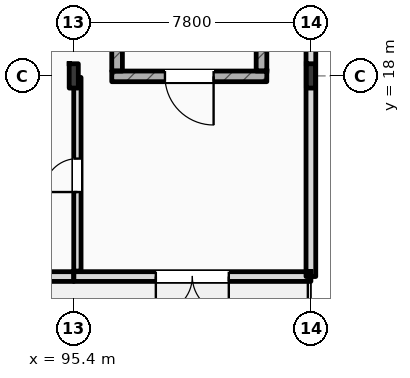
"""IFC4 building model, lengths in metres.
Left out: names, types, materials, properties, quantities, classifications, styles, units other than length and angle.
Written with IfcOpenShell. Run it as: python <this file> out.ifc"""

import sys

from ifc_helpers import new_model, si_unit, direction, frame, frame_2d, origin, origin_2d, place, context, subcontext, project, spatial, rectangle, i_section, extrude, element, fill, save


model = new_model("IFC4")
c1 = context("Model", 3, precision=1e-05, world=origin(), true_north=direction((0.0, 1.0)))
c2 = subcontext(c1, "Body", "Model", "MODEL_VIEW")
j1 = project(units=[si_unit("LENGTHUNIT", "METRE"), si_unit("PLANEANGLEUNIT", "RADIAN")], contexts=[c1])
p1 = place(None, origin())
s1 = spatial("IfcSite", under=j1, at=p1, CompositionType="ELEMENT")
p2 = place(p1, origin())
s2 = spatial("IfcBuilding", under=s1, at=p2, CompositionType="ELEMENT")
p3 = place(p2, origin())
s3 = spatial("IfcBuildingStorey", under=s2, at=p3, CompositionType="ELEMENT", Elevation=0.0)
for number, where, z_axis, x_axis in (
    (1, (95.4, 18.0, 0.0), (0.0, 0.0, 1.0), (1.0, 0.0, 0.0)),
    (2, (103.2, 18.0, 0.0), (0.0, 0.0, 1.0), (1.0, 0.0, 0.0)),
):
    element("IfcColumn", number, at=place(p3, frame(where, z_axis=z_axis, x_axis=x_axis)), inside=s3, PredefinedType="COLUMN", context=c2, shape_type="SweptSolid", body=[
        extrude(i_section(OverallWidth=0.3, OverallDepth=0.8, WebThickness=0.018, FlangeThickness=0.033, FilletRadius=0.03, at=origin_2d()), origin(), (0.0, 0.0, 1.0), 6.0),
    ])
p4 = place(p3, frame((96.65, 17.985, 0.0), z_axis=(0.0, 0.0, 1.0), x_axis=(1.0, 0.0, 0.0)))
e3 = element("IfcWall", 3, at=p4, inside=s3, PredefinedType="SHEAR", context=c2, shape_type="SweptSolid", body=[
    extrude(rectangle(XDim=5.1, YDim=0.35, at=frame_2d((2.55, 0.0))), origin(), (0.0, 0.0, 1.0), 6.0),
])
p5 = place(p4, frame((1.75, 0.0, 0.0)))
e4 = element("IfcOpeningElement", 4, at=p5, cuts=e3, PredefinedType="OPENING", context=c2, shape_type="SweptSolid", body=[
    extrude(rectangle(XDim=1.6, YDim=2.2, at=frame_2d((0.8, 1.1))), frame((0.0, 0.185, 0.0), z_axis=(0.0, -1.0, 0.0), x_axis=(1.0, 0.0, 0.0)), (0.0, 0.0, 1.0), 0.37),
])
for number, where, z_axis, x_axis in (
    (5, (96.825, 18.16, 0.0), (0.0, 0.0, 1.0), (0.0, 1.0, 0.0)),
    (6, (101.575, 18.16, 0.0), (0.0, 0.0, 1.0), (0.0, 1.0, 0.0)),
):
    element("IfcWall", number, at=place(p3, frame(where, z_axis=z_axis, x_axis=x_axis)), inside=s3, PredefinedType="SHEAR", context=c2, shape_type="SweptSolid", body=[
        extrude(rectangle(XDim=8.68, YDim=0.35, at=frame_2d((4.34, 0.0))), origin(), (0.0, 0.0, 1.0), 6.0),
    ])
p6 = place(p3, frame((87.6, 11.4, 0.0), z_axis=(0.0, 0.0, 1.0), x_axis=(1.0, 0.0, 0.0)))
e7 = element("IfcWall", 7, at=p6, inside=s3, PredefinedType="STANDARD", context=c2, shape_type="SweptSolid", body=[
    extrude(rectangle(XDim=7.8, YDim=0.32, at=frame_2d((3.9, 0.0))), origin(), (0.0, 0.0, 1.0), 5.7),
])
p7 = place(p6, frame((2.7, 0.0, 0.0)))
e8 = element("IfcOpeningElement", 8, at=p7, cuts=e7, PredefinedType="OPENING", context=c2, shape_type="SweptSolid", body=[
    extrude(rectangle(XDim=2.4, YDim=2.6, at=frame_2d((1.2, 1.3))), frame((0.0, 0.17, 0.0), z_axis=(0.0, -1.0, 0.0), x_axis=(1.0, 0.0, 0.0)), (0.0, 0.0, 1.0), 0.34),
])
p8 = place(p3, frame((95.4, 11.4, 0.0), z_axis=(0.0, 0.0, 1.0), x_axis=(1.0, 0.0, 0.0)))
e9 = element("IfcWall", 9, at=p8, inside=s3, PredefinedType="STANDARD", context=c2, shape_type="SweptSolid", body=[
    extrude(rectangle(XDim=7.8, YDim=0.32, at=frame_2d((3.9, 0.0))), origin(), (0.0, 0.0, 1.0), 5.7),
])
p9 = place(p8, frame((2.7, 0.0, 0.0)))
e10 = element("IfcOpeningElement", 10, at=p9, cuts=e9, PredefinedType="OPENING", context=c2, shape_type="SweptSolid", body=[
    extrude(rectangle(XDim=2.4, YDim=2.6, at=frame_2d((1.2, 1.3))), frame((0.0, 0.17, 0.0), z_axis=(0.0, -1.0, 0.0), x_axis=(1.0, 0.0, 0.0)), (0.0, 0.0, 1.0), 0.34),
])
p10 = place(p3, frame((103.2, 11.4, 0.0), z_axis=(0.0, 0.0, 1.0), x_axis=(0.0, 1.0, 0.0)))
e11 = element("IfcWall", 11, at=p10, inside=s3, PredefinedType="STANDARD", context=c2, shape_type="SweptSolid", body=[
    extrude(rectangle(XDim=42.55, YDim=0.32, at=frame_2d((21.275, 0.0))), origin(), (0.0, 0.0, 1.0), 5.2),
])
p11 = place(p10, frame((30.2, 0.0, 0.0)))
e12 = element("IfcOpeningElement", 12, at=p11, cuts=e11, PredefinedType="OPENING", context=c2, shape_type="SweptSolid", body=[
    extrude(rectangle(XDim=1.6, YDim=2.3, at=frame_2d((0.8, 1.15))), frame((0.0, 0.17, 0.0), z_axis=(0.0, -1.0, 0.0), x_axis=(1.0, 0.0, 0.0)), (0.0, 0.0, 1.0), 0.34),
])
p12 = place(p3, frame((95.52, 11.58, 0.0), z_axis=(0.0, 0.0, 1.0), x_axis=(0.0, 1.0, 0.0)))
e13 = element("IfcWall", 13, at=p12, inside=s3, PredefinedType="STANDARD", context=c2, shape_type="SweptSolid", body=[
    extrude(rectangle(XDim=6.37, YDim=0.24, at=frame_2d((3.185, 0.0))), origin(), (0.0, 0.0, 1.0), 5.2),
])
p13 = place(p12, frame((2.6, 0.0, 0.0)))
e14 = element("IfcOpeningElement", 14, at=p13, cuts=e13, PredefinedType="OPENING", context=c2, shape_type="SweptSolid", body=[
    extrude(rectangle(XDim=1.1, YDim=2.2, at=frame_2d((0.55, 1.1))), frame((0.0, 0.13, 0.0), z_axis=(0.0, -1.0, 0.0), x_axis=(1.0, 0.0, 0.0)), (0.0, 0.0, 1.0), 0.26),
])
p14 = place(p9, frame((2.4, 0.0, 0.0), z_axis=(0.0, 0.0, 1.0), x_axis=(-1.0, 0.0, 0.0)))
e15 = element("IfcDoor", 15, at=p14, inside=s3, OperationType="DOUBLE_SWING_LEFT", PredefinedType="DOOR", context=c2, shape_type="SweptSolid", body=[
    extrude(rectangle(XDim=2.4, YDim=2.6, at=frame_2d((1.2, 1.3))), frame((0.0, 0.025, 0.0), z_axis=(0.0, -1.0, 0.0), x_axis=(1.0, 0.0, 0.0)), (0.0, 0.0, 1.0), 0.05),
])
fill(e10, e15)
p15 = place(p5, frame((1.6, 0.0, 0.0), z_axis=(0.0, 0.0, 1.0), x_axis=(-1.0, 0.0, 0.0)))
e16 = element("IfcDoor", 16, at=p15, inside=s3, OperationType="SINGLE_SWING_RIGHT", PredefinedType="DOOR", context=c2, shape_type="SweptSolid", body=[
    extrude(rectangle(XDim=1.6, YDim=2.2, at=frame_2d((0.8, 1.1))), frame((0.0, 0.025, 0.0), z_axis=(0.0, -1.0, 0.0), x_axis=(1.0, 0.0, 0.0)), (0.0, 0.0, 1.0), 0.05),
])
fill(e4, e16)
p16 = place(p13, origin())
e17 = element("IfcDoor", 17, at=p16, inside=s3, OperationType="SINGLE_SWING_LEFT", PredefinedType="DOOR", context=c2, shape_type="SweptSolid", body=[
    extrude(rectangle(XDim=1.1, YDim=2.2, at=frame_2d((0.55, 1.1))), frame((0.0, 0.025, 0.0), z_axis=(0.0, -1.0, 0.0), x_axis=(1.0, 0.0, 0.0)), (0.0, 0.0, 1.0), 0.05),
])
fill(e14, e17)
save(model, sys.argv[1])
